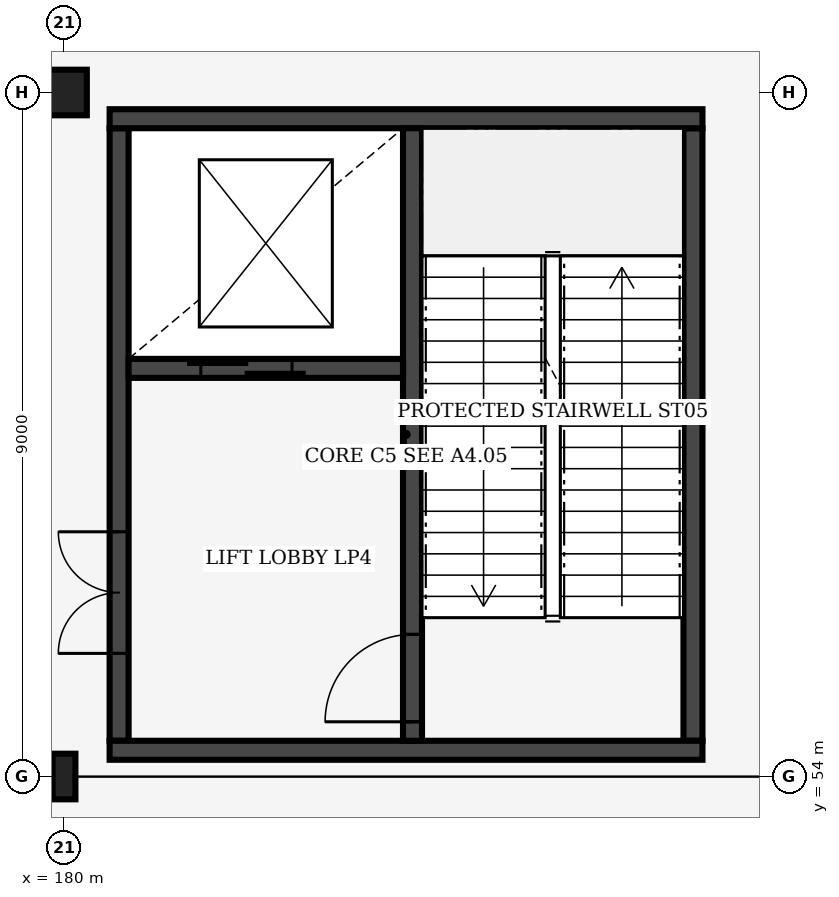
"""IFC4 building model, lengths in metres.
Left out: names, types, materials, properties, quantities, classifications, styles, units other than length and angle.
Written with IfcOpenShell. Run it as: python <this file> out.ifc"""

import sys

from ifc_helpers import new_model, si_unit, direction, frame, frame_2d, origin, origin_2d, place, context, subcontext, project, spatial, rectangle, i_section, extrude, element, fill, save


model = new_model("IFC4")
c1 = context("Model", 3, precision=1e-05, world=origin(), true_north=direction((0.0, 1.0)))
c2 = subcontext(c1, "Body", "Model", "MODEL_VIEW")
j1 = project(units=[si_unit("LENGTHUNIT", "METRE"), si_unit("PLANEANGLEUNIT", "RADIAN")], contexts=[c1])
p1 = place(None, origin())
s1 = spatial("IfcSite", under=j1, at=p1, CompositionType="ELEMENT")
p2 = place(p1, origin())
s2 = spatial("IfcBuilding", under=s1, at=p2, CompositionType="ELEMENT")
p3 = place(p2, frame((0.0, 0.0, 6.0)))
s3 = spatial("IfcBuildingStorey", under=s2, at=p3, CompositionType="ELEMENT", Elevation=6.0)
p4 = place(p3, frame((180.0, 54.0, 0.0), z_axis=(0.0, 0.0, 1.0), x_axis=(1.0, 0.0, 0.0)))
e1 = element("IfcColumn", 1, at=p4, inside=s3, PredefinedType="COLUMN", context=c2, shape_type="SweptSolid", body=[
    extrude(i_section(OverallWidth=0.3, OverallDepth=0.6, WebThickness=0.015, FlangeThickness=0.03, FilletRadius=0.027, at=origin_2d()), origin(), (0.0, 0.0, 1.0), 6.0),
])
p5 = place(p3, frame((180.0, 63.0, 0.0), z_axis=(0.0, 0.0, 1.0), x_axis=(1.0, 0.0, 0.0)))
e2 = element("IfcColumn", 2, at=p5, inside=s3, PredefinedType="COLUMN", context=c2, shape_type="SweptSolid", body=[
    extrude(rectangle(XDim=0.6, YDim=0.6, at=origin_2d()), origin(), (0.0, 0.0, 1.0), 6.0),
])
p6 = place(p3, frame((180.725, 54.47, 0.0), z_axis=(0.0, 0.0, 1.0), x_axis=(0.0, 1.0, 0.0)))
e3 = element("IfcWall", 3, at=p6, inside=s3, PredefinedType="SHEAR", context=c2, shape_type="SweptSolid", body=[
    extrude(rectangle(XDim=8.06, YDim=0.25, at=frame_2d((4.03, 0.0))), origin(), (0.0, 0.0, 1.0), 5.64),
])
p7 = place(p6, frame((1.15, 0.0, 0.0)))
e4 = element("IfcOpeningElement", 4, at=p7, cuts=e3, PredefinedType="OPENING", context=c2, shape_type="SweptSolid", body=[
    extrude(rectangle(XDim=1.6, YDim=2.2, at=frame_2d((0.8, 1.1))), frame((0.0, 0.135, 0.0), z_axis=(0.0, -1.0, 0.0), x_axis=(1.0, 0.0, 0.0)), (0.0, 0.0, 1.0), 0.27),
])
p8 = place(p3, frame((188.275, 54.47, 0.0), z_axis=(0.0, 0.0, 1.0), x_axis=(0.0, 1.0, 0.0)))
e5 = element("IfcWall", 5, at=p8, inside=s3, PredefinedType="SHEAR", context=c2, shape_type="SweptSolid", body=[
    extrude(rectangle(XDim=8.06, YDim=0.25, at=frame_2d((4.03, 0.0))), origin(), (0.0, 0.0, 1.0), 5.64),
])
for number, where, z_axis, x_axis in (
    (6, (180.6, 54.345, 0.0), (0.0, 0.0, 1.0), (1.0, 0.0, 0.0)),
    (7, (180.6, 62.655, 0.0), (0.0, 0.0, 1.0), (1.0, 0.0, 0.0)),
):
    element("IfcWall", number, at=place(p3, frame(where, z_axis=z_axis, x_axis=x_axis)), inside=s3, PredefinedType="SHEAR", context=c2, shape_type="SweptSolid", body=[
        extrude(rectangle(XDim=7.8, YDim=0.25, at=frame_2d((3.9, 0.0))), origin(), (0.0, 0.0, 1.0), 5.64),
    ])
p9 = place(p3, frame((184.585, 54.47, 0.0), z_axis=(0.0, 0.0, 1.0), x_axis=(0.0, 1.0, 0.0)))
e8 = element("IfcWall", 8, at=p9, inside=s3, PredefinedType="SHEAR", context=c2, shape_type="SweptSolid", body=[
    extrude(rectangle(XDim=8.06, YDim=0.25, at=frame_2d((4.03, 0.0))), origin(), (0.0, 0.0, 1.0), 5.64),
])
p10 = place(p9, frame((0.25, 0.0, 0.0)))
e9 = element("IfcOpeningElement", 9, at=p10, cuts=e8, PredefinedType="OPENING", context=c2, shape_type="SweptSolid", body=[
    extrude(rectangle(XDim=1.15, YDim=2.15, at=frame_2d((0.575, 1.075))), frame((0.0, 0.135, 0.0), z_axis=(0.0, -1.0, 0.0), x_axis=(1.0, 0.0, 0.0)), (0.0, 0.0, 1.0), 0.27),
])
p11 = place(p3, frame((180.85, 59.37, 0.0), z_axis=(0.0, 0.0, 1.0), x_axis=(1.0, 0.0, 0.0)))
e10 = element("IfcWall", 10, at=p11, inside=s3, PredefinedType="SHEAR", context=c2, shape_type="SweptSolid", body=[
    extrude(rectangle(XDim=3.61, YDim=0.25, at=frame_2d((1.805, 0.0))), origin(), (0.0, 0.0, 1.0), 5.64),
])
p12 = place(p11, frame((0.95, 0.0, 0.0)))
e11 = element("IfcOpeningElement", 11, at=p12, cuts=e10, PredefinedType="OPENING", context=c2, shape_type="SweptSolid", body=[
    extrude(rectangle(XDim=1.2, YDim=2.2, at=frame_2d((0.6, 1.1))), frame((0.0, 0.135, 0.0), z_axis=(0.0, -1.0, 0.0), x_axis=(1.0, 0.0, 0.0)), (0.0, 0.0, 1.0), 0.27),
])
p13 = place(p10, origin())
e12 = element("IfcDoor", 12, at=p13, inside=s3, OperationType="SINGLE_SWING_LEFT", PredefinedType="DOOR", context=c2, shape_type="SweptSolid", body=[
    extrude(rectangle(XDim=1.15, YDim=2.15, at=frame_2d((0.575, 1.075))), frame((0.0, 0.025, 0.0), z_axis=(0.0, -1.0, 0.0), x_axis=(1.0, 0.0, 0.0)), (0.0, 0.0, 1.0), 0.05),
])
fill(e9, e12)
p14 = place(p12, origin())
e13 = element("IfcDoor", 13, at=p14, inside=s3, OperationType="DOUBLE_DOOR_SLIDING", PredefinedType="DOOR", context=c2, shape_type="SweptSolid", body=[
    extrude(rectangle(XDim=1.2, YDim=2.2, at=frame_2d((0.6, 1.1))), frame((0.0, 0.025, 0.0), z_axis=(0.0, -1.0, 0.0), x_axis=(1.0, 0.0, 0.0)), (0.0, 0.0, 1.0), 0.05),
])
fill(e11, e13)
p15 = place(p7, origin())
e14 = element("IfcDoor", 14, at=p15, inside=s3, OperationType="DOUBLE_DOOR_SINGLE_SWING", PredefinedType="DOOR", context=c2, shape_type="SweptSolid", body=[
    extrude(rectangle(XDim=1.6, YDim=2.2, at=frame_2d((0.8, 1.1))), frame((0.0, 0.025, 0.0), z_axis=(0.0, -1.0, 0.0), x_axis=(1.0, 0.0, 0.0)), (0.0, 0.0, 1.0), 0.05),
])
fill(e4, e14)
save(model, sys.argv[1])
